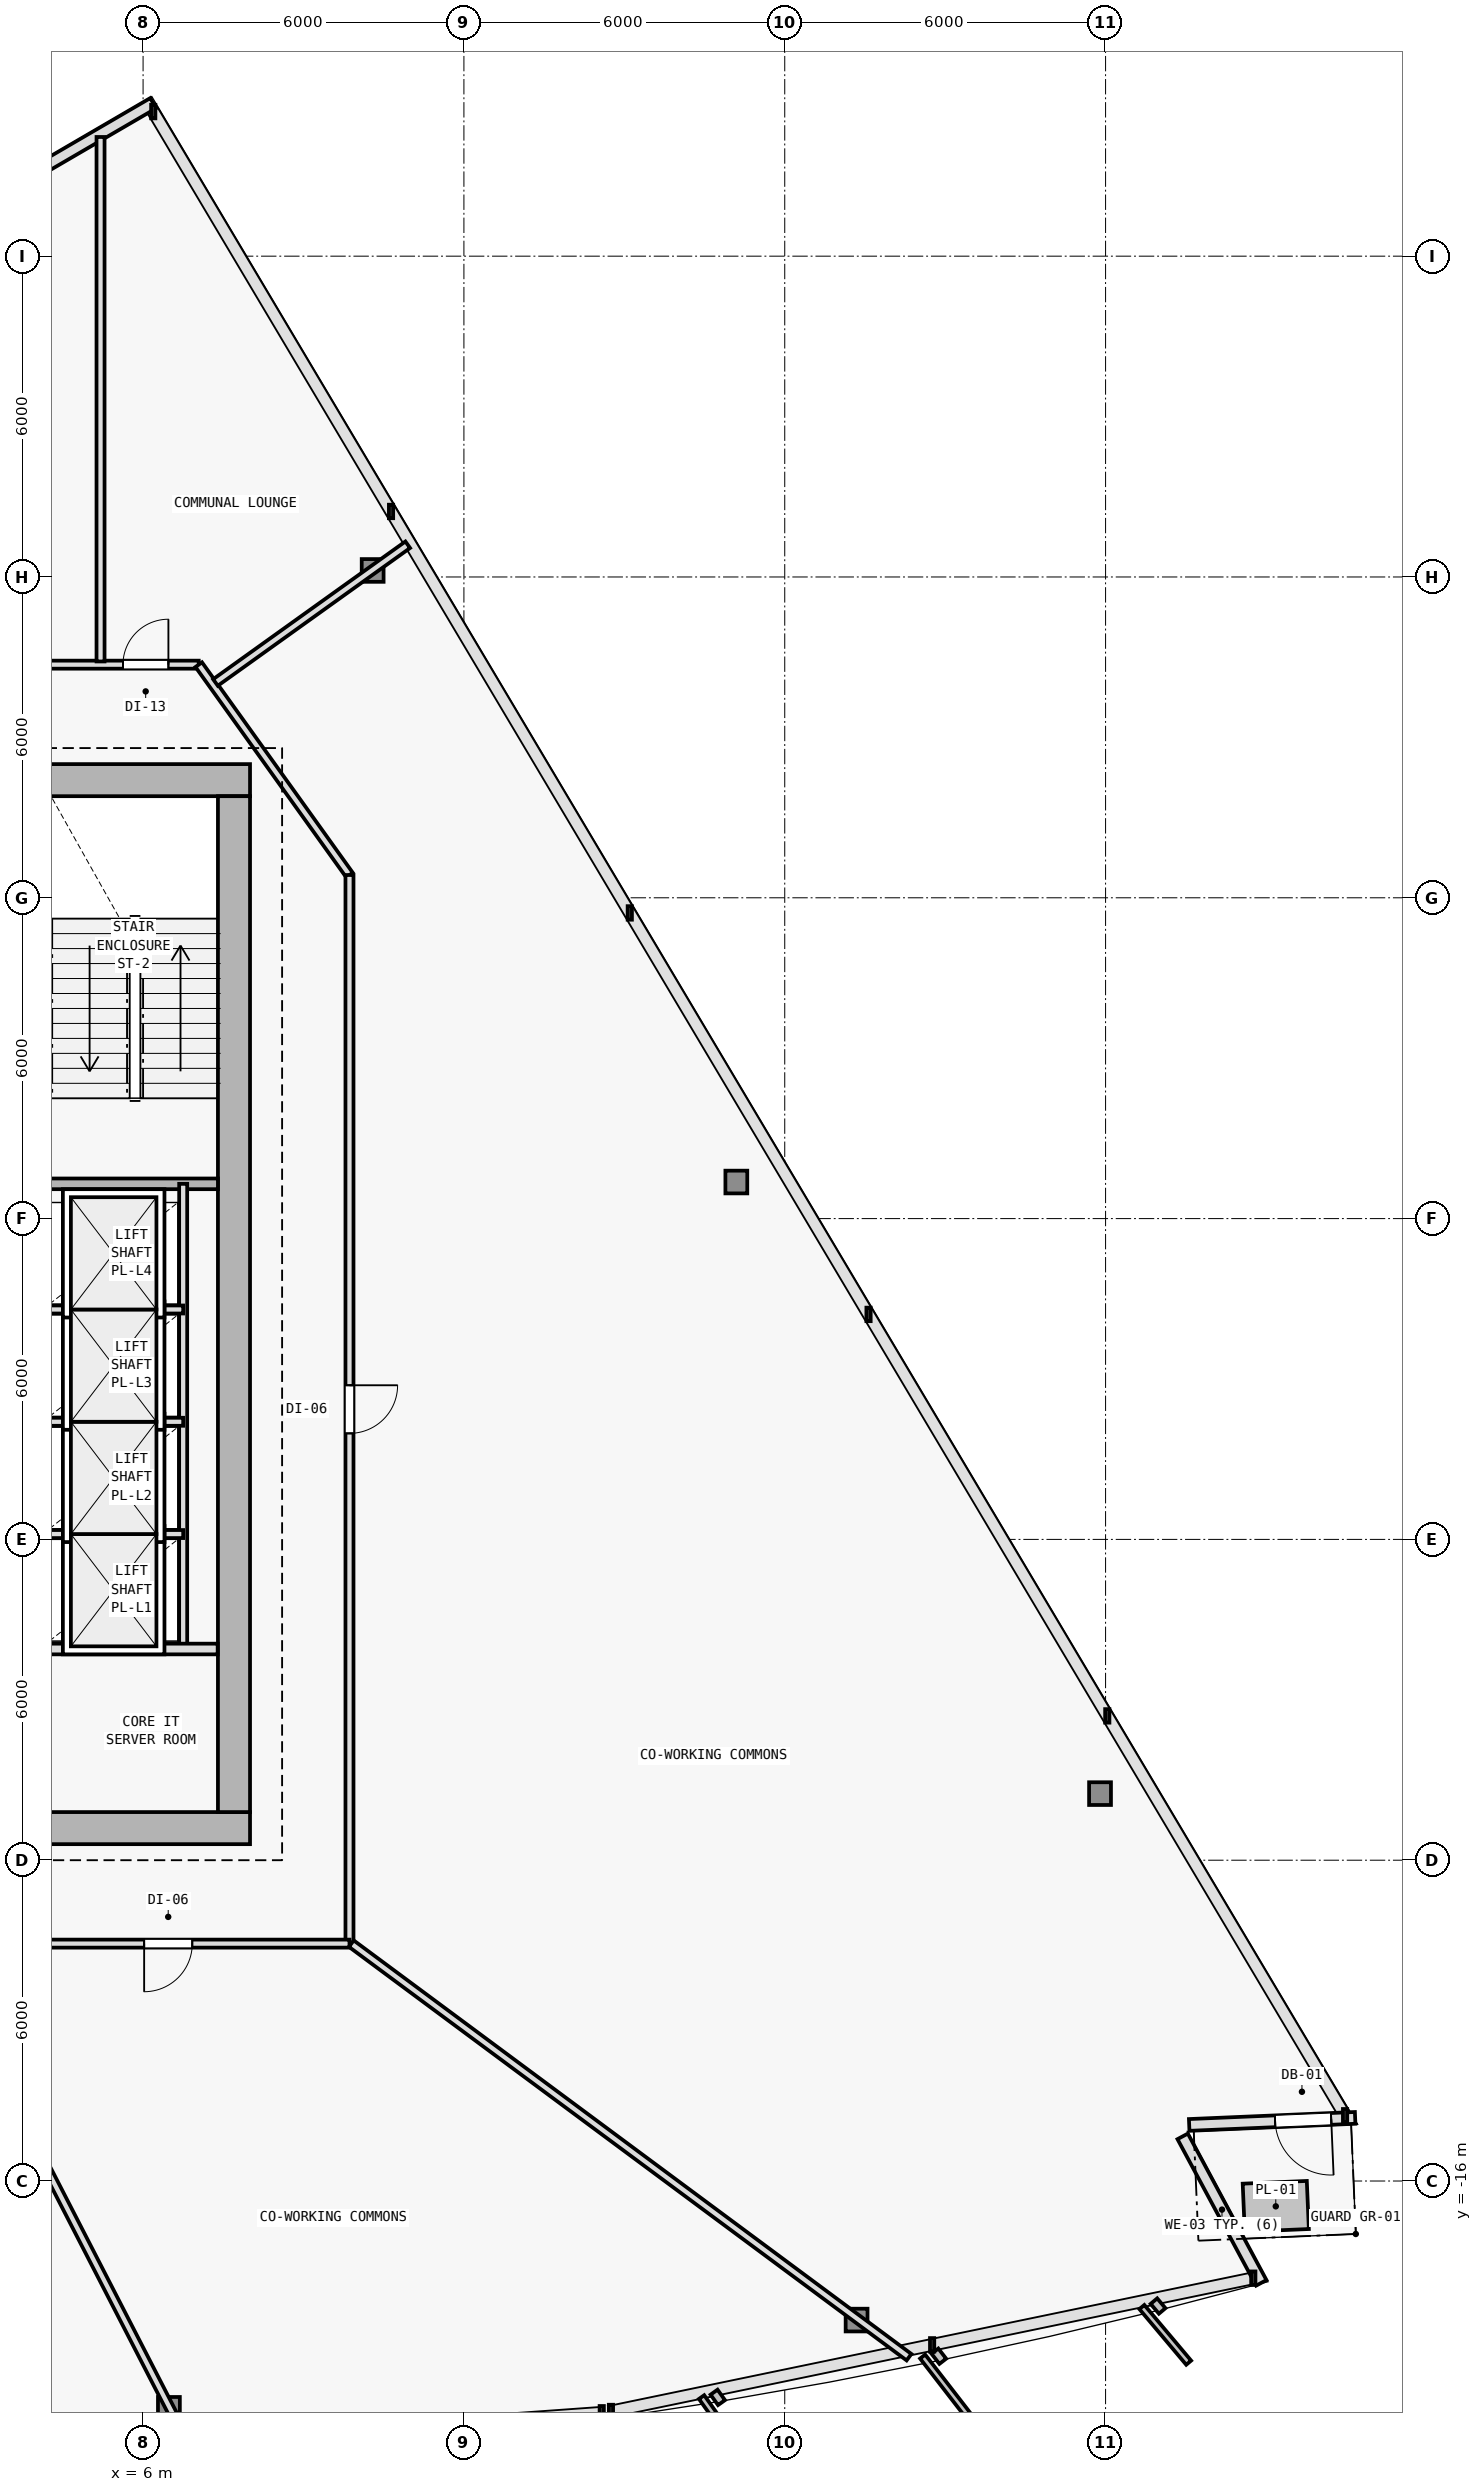
"""IFC4 building model, lengths in metres.
Left out: names, types, materials, properties, quantities, classifications, styles, units other than length and angle.
Written with IfcOpenShell. Run it as: python <this file> out.ifc"""

import sys

from ifc_helpers import new_model, si_unit, direction, frame, frame_2d, origin, origin_2d, place, context, subcontext, project, spatial, rectangle, i_section, extrude, element, fill, save


model = new_model("IFC4")
c1 = context("Model", 3, precision=1e-05, world=origin(), true_north=direction((0.0, 1.0)))
c2 = subcontext(c1, "Body", "Model", "MODEL_VIEW")
j1 = project(units=[si_unit("LENGTHUNIT", "METRE"), si_unit("PLANEANGLEUNIT", "RADIAN")], contexts=[c1])
p1 = place(None, origin())
s1 = spatial("IfcSite", under=j1, at=p1, CompositionType="ELEMENT")
p2 = place(p1, origin())
s2 = spatial("IfcBuilding", under=s1, at=p2, CompositionType="ELEMENT")
p3 = place(p2, frame((0.0, 0.0, 78.0)))
s3 = spatial("IfcBuildingStorey", under=s2, at=p3, CompositionType="ELEMENT", Elevation=78.0)
for number, where, z_axis, x_axis in (
    (1, (7.7, -9.4, 0.0), (0.0, 0.0, 1.0), (1.0, 0.0, 0.0)),
    (2, (7.7, 10.2, 0.0), (0.0, 0.0, 1.0), (1.0, 0.0, 0.0)),
    (3, (7.7, 0.4, 0.0), (0.0, 0.0, 1.0), (1.0, 0.0, 0.0)),
):
    element("IfcColumn", number, at=place(p3, frame(where, z_axis=z_axis, x_axis=x_axis)), inside=s3, PredefinedType="COLUMN", context=c2, shape_type="SweptSolid", body=[
        extrude(i_section(OverallWidth=0.416, OverallDepth=0.446, WebThickness=0.025, FlangeThickness=0.04, FilletRadius=0.015, at=origin_2d()), origin(), (0.0, 0.0, 1.0), 4.5),
    ])
p4 = place(p3, frame((6.483, -20.252, 0.006), z_axis=(-0.005491040061, 0.028216334572, 0.999586758087), x_axis=(-0.981585848295, -0.191021523464, 0.0)))
e4 = element("IfcColumn", 4, at=p4, inside=s3, PredefinedType="COLUMN", context=c2, shape_type="SweptSolid", body=[
    extrude(i_section(OverallWidth=0.409, OverallDepth=0.425, WebThickness=0.021, FlangeThickness=0.034, FilletRadius=0.015, at=origin_2d()), origin(), (0.0, 0.0, 1.0), 4.491),
])
p5 = place(p3, frame((19.344, -18.601, 0.006), z_axis=(-0.016526121628, 0.026800585403, 0.999504185047), x_axis=(-0.851183725565, -0.524867855115, 0.0)))
e5 = element("IfcColumn", 5, at=p5, inside=s3, PredefinedType="COLUMN", context=c2, shape_type="SweptSolid", body=[
    extrude(i_section(OverallWidth=0.409, OverallDepth=0.425, WebThickness=0.021, FlangeThickness=0.034, FilletRadius=0.015, at=origin_2d()), origin(), (0.0, 0.0, 1.0), 4.491),
])
p6 = place(p3, frame((23.896, -8.755, 0.006), z_axis=(-0.020877781541, 0.017289412838, 0.999632529704), x_axis=(-0.637813971185, -0.770190455771, 0.0)))
e6 = element("IfcColumn", 6, at=p6, inside=s3, PredefinedType="COLUMN", context=c2, shape_type="SweptSolid", body=[
    extrude(i_section(OverallWidth=0.409, OverallDepth=0.425, WebThickness=0.021, FlangeThickness=0.034, FilletRadius=0.015, at=origin_2d()), origin(), (0.0, 0.0, 1.0), 4.49),
])
p7 = place(p3, frame((17.095, 2.684, 0.006), z_axis=(-0.015118033886, 0.00761339836, 0.999856730345), x_axis=(-0.449781931574, -0.893138406984, 0.0)))
e7 = element("IfcColumn", 7, at=p7, inside=s3, PredefinedType="COLUMN", context=c2, shape_type="SweptSolid", body=[
    extrude(i_section(OverallWidth=0.409, OverallDepth=0.425, WebThickness=0.021, FlangeThickness=0.034, FilletRadius=0.015, at=origin_2d()), origin(), (0.0, 0.0, 1.0), 4.49),
])
p8 = place(p3, frame((10.293, 14.122, 0.006), z_axis=(-0.009354515717, -0.002012308614, 0.999954220777), x_axis=(0.210305364179, -0.977635746993, 0.0)))
e8 = element("IfcColumn", 8, at=p8, inside=s3, PredefinedType="COLUMN", context=c2, shape_type="SweptSolid", body=[
    extrude(i_section(OverallWidth=0.409, OverallDepth=0.425, WebThickness=0.021, FlangeThickness=0.034, FilletRadius=0.015, at=origin_2d()), origin(), (0.0, 0.0, 1.0), 4.489),
])
p9 = place(p3, frame((25.442, -15.165, 0.0), z_axis=(0.0, 0.0, 1.0), x_axis=(0.472811757317, -0.881163459378, 0.0)))
e9 = element("IfcWall", 9, at=p9, inside=s3, PredefinedType="SOLIDWALL", context=c2, shape_type="SweptSolid", body=[
    extrude(rectangle(XDim=3.11, YDim=0.22, at=frame_2d((1.555, 0.0))), origin(), (0.0, 0.0, 1.0), 4.25),
])
p10 = place(p3, frame((28.667, -14.819, 0.0), z_axis=(0.0, 0.0, 1.0), x_axis=(-0.99909228571, -0.042598176436, 0.0)))
e10 = element("IfcWall", 10, at=p10, inside=s3, PredefinedType="SOLIDWALL", context=c2, shape_type="SweptSolid", body=[
    extrude(rectangle(XDim=3.106, YDim=0.22, at=frame_2d((1.553, 0.0))), origin(), (0.0, 0.0, 1.0), 4.25),
])
p11 = place(p10, frame((0.448, 0.0, 0.0)))
e11 = element("IfcOpeningElement", 11, at=p11, cuts=e10, PredefinedType="OPENING", context=c2, shape_type="SweptSolid", body=[
    extrude(rectangle(XDim=1.05, YDim=2.15, at=frame_2d((0.525, 1.075))), frame((0.0, 0.12, 0.0), z_axis=(0.0, -1.0, 0.0), x_axis=(1.0, 0.0, 0.0)), (0.0, 0.0, 1.0), 0.24),
])
p12 = place(p3, frame((2.142, 20.502, 0.0), z_axis=(0.0, 0.0, 1.0), x_axis=(0.863981097269, 0.503524243272, 0.0)))
e12 = element("IfcWall", 12, at=p12, inside=s3, PredefinedType="SOLIDWALL", context=c2, shape_type="SweptSolid", body=[
    extrude(rectangle(XDim=4.684, YDim=0.22, at=frame_2d((2.342, 0.0))), origin(), (0.0, 0.0, 1.0), 4.25),
])
p13 = place(p3, frame((-8.0, -9.4, 0.0), z_axis=(0.0, 0.0, 1.0), x_axis=(1.0, 0.0, 0.0)))
e13 = element("IfcWall", 13, at=p13, inside=s3, PredefinedType="SHEAR", context=c2, shape_type="SweptSolid", body=[
    extrude(rectangle(XDim=16.0, YDim=0.6, at=frame_2d((8.0, 0.0))), origin(), (0.0, 0.0, 1.0), 4.25),
])
p14 = place(p13, frame((9.65, 0.0, 0.0)))
e14 = element("IfcOpeningElement", 14, at=p14, cuts=e13, PredefinedType="OPENING", context=c2, shape_type="SweptSolid", body=[
    extrude(rectangle(XDim=1.5, YDim=2.2, at=frame_2d((0.75, 1.1))), frame((0.0, 0.31, 0.0), z_axis=(0.0, -1.0, 0.0), x_axis=(1.0, 0.0, 0.0)), (0.0, 0.0, 1.0), 0.62),
])
p15 = place(p3, frame((8.0, 10.2, 0.0), z_axis=(0.0, 0.0, 1.0), x_axis=(-1.0, 0.0, 0.0)))
e15 = element("IfcWall", 15, at=p15, inside=s3, PredefinedType="SHEAR", context=c2, shape_type="SweptSolid", body=[
    extrude(rectangle(XDim=16.0, YDim=0.6, at=frame_2d((8.0, 0.0))), origin(), (0.0, 0.0, 1.0), 4.25),
])
p16 = place(p15, frame((4.45, 0.0, 0.0)))
e16 = element("IfcOpeningElement", 16, at=p16, cuts=e15, PredefinedType="OPENING", context=c2, shape_type="SweptSolid", body=[
    extrude(rectangle(XDim=1.1, YDim=2.15, at=frame_2d((0.55, 1.075))), frame((0.0, 0.31, 0.0), z_axis=(0.0, -1.0, 0.0), x_axis=(1.0, 0.0, 0.0)), (0.0, 0.0, 1.0), 0.62),
])
p17 = place(p3, frame((7.7, 9.9, 0.0), z_axis=(0.0, 0.0, 1.0), x_axis=(0.0, -1.0, 0.0)))
e17 = element("IfcWall", 17, at=p17, inside=s3, PredefinedType="SHEAR", context=c2, shape_type="SweptSolid", body=[
    extrude(rectangle(XDim=19.0, YDim=0.6, at=frame_2d((9.5, 0.0))), origin(), (0.0, 0.0, 1.0), 4.25),
])
p18 = place(p3, frame((4.05, 2.65, 0.0), z_axis=(0.0, 0.0, 1.0), x_axis=(1.0, 0.0, 0.0)))
e18 = element("IfcWall", 18, at=p18, inside=s3, PredefinedType="SOLIDWALL", context=c2, shape_type="SweptSolid", body=[
    extrude(rectangle(XDim=3.35, YDim=0.2, at=frame_2d((1.675, 0.0))), origin(), (0.0, 0.0, 1.0), 4.25),
])
p19 = place(p3, frame((6.75, -6.05, 0.0), z_axis=(0.0, 0.0, 1.0), x_axis=(0.0, 1.0, 0.0)))
e19 = element("IfcWall", 19, at=p19, inside=s3, PredefinedType="PARTITIONING", context=c2, shape_type="SweptSolid", body=[
    extrude(rectangle(XDim=8.7, YDim=0.15, at=frame_2d((4.35, 0.0))), origin(), (0.0, 0.0, 1.0), 4.25),
])
for number, where, z_axis, x_axis in (
    (20, (4.15, -3.9, 0.0), (0.0, 0.0, 1.0), (1.0, 0.0, 0.0)),
    (21, (4.15, -1.8, 0.0), (0.0, 0.0, 1.0), (1.0, 0.0, 0.0)),
    (22, (4.15, 0.3, 0.0), (0.0, 0.0, 1.0), (1.0, 0.0, 0.0)),
):
    element("IfcWall", number, at=place(p3, frame(where, z_axis=z_axis, x_axis=x_axis)), inside=s3, PredefinedType="PARTITIONING", context=c2, shape_type="SweptSolid", body=[
        extrude(rectangle(XDim=2.6, YDim=0.15, at=frame_2d((1.3, 0.0))), origin(), (0.0, 0.0, 1.0), 4.25),
    ])
p20 = place(p3, frame((4.15, -6.05, 0.0), z_axis=(0.0, 0.0, 1.0), x_axis=(1.0, 0.0, 0.0)))
e23 = element("IfcWall", 23, at=p20, inside=s3, PredefinedType="SOLIDWALL", context=c2, shape_type="SweptSolid", body=[
    extrude(rectangle(XDim=3.245, YDim=0.2, at=frame_2d((1.623, 0.0))), origin(), (0.0, 0.0, 1.0), 4.25),
])
p21 = place(p3, frame((-7.041, 12.36, 0.0), z_axis=(0.0, 0.0, 1.0), x_axis=(1.0, 0.0, 0.0)))
e24 = element("IfcWall", 24, at=p21, inside=s3, PredefinedType="PARTITIONING", context=c2, shape_type="SweptSolid", body=[
    extrude(rectangle(XDim=14.082, YDim=0.15, at=frame_2d((7.041, 0.0))), origin(), (0.0, 0.0, 1.0), 4.25),
])
p22 = place(p21, frame((12.665, 0.0, 0.0)))
e25 = element("IfcOpeningElement", 25, at=p22, cuts=e24, PredefinedType="OPENING", context=c2, shape_type="SweptSolid", body=[
    extrude(rectangle(XDim=0.85, YDim=2.1, at=frame_2d((0.425, 1.05))), frame((0.0, 0.085, 0.0), z_axis=(0.0, -1.0, 0.0), x_axis=(1.0, 0.0, 0.0)), (0.0, 0.0, 1.0), 0.17),
])
p23 = place(p21, frame((9.584, 0.0, 0.0)))
e26 = element("IfcOpeningElement", 26, at=p23, cuts=e24, PredefinedType="OPENING", context=c2, shape_type="SweptSolid", body=[
    extrude(rectangle(XDim=0.9, YDim=2.1, at=frame_2d((0.45, 1.05))), frame((0.0, 0.085, 0.0), z_axis=(0.0, -1.0, 0.0), x_axis=(1.0, 0.0, 0.0)), (0.0, 0.0, 1.0), 0.17),
])
p24 = place(p21, frame((5.465, 0.0, 0.0)))
e27 = element("IfcOpeningElement", 27, at=p24, cuts=e24, PredefinedType="OPENING", context=c2, shape_type="SweptSolid", body=[
    extrude(rectangle(XDim=0.9, YDim=2.1, at=frame_2d((0.45, 1.05))), frame((0.0, 0.085, 0.0), z_axis=(0.0, -1.0, 0.0), x_axis=(1.0, 0.0, 0.0)), (0.0, 0.0, 1.0), 0.17),
])
p25 = place(p21, frame((1.642, 0.0, 0.0)))
e28 = element("IfcOpeningElement", 28, at=p25, cuts=e24, PredefinedType="OPENING", context=c2, shape_type="SweptSolid", body=[
    extrude(rectangle(XDim=0.9, YDim=2.1, at=frame_2d((0.45, 1.05))), frame((0.0, 0.085, 0.0), z_axis=(0.0, -1.0, 0.0), x_axis=(1.0, 0.0, 0.0)), (0.0, 0.0, 1.0), 0.17),
])
p26 = place(p3, frame((7.041, 12.36, 0.0), z_axis=(0.0, 0.0, 1.0), x_axis=(0.582449511476, -0.812866881218, 0.0)))
e29 = element("IfcWall", 29, at=p26, inside=s3, PredefinedType="PARTITIONING", context=c2, shape_type="SweptSolid", body=[
    extrude(rectangle(XDim=4.84, YDim=0.15, at=frame_2d((2.42, 0.0))), origin(), (0.0, 0.0, 1.0), 3.625),
])
p27 = place(p3, frame((9.86, 8.426, 0.0), z_axis=(0.0, 0.0, 1.0), x_axis=(0.0, -1.0, 0.0)))
e30 = element("IfcWall", 30, at=p27, inside=s3, PredefinedType="PARTITIONING", context=c2, shape_type="SweptSolid", body=[
    extrude(rectangle(XDim=19.986, YDim=0.15, at=frame_2d((9.993, 0.0))), origin(), (0.0, 0.0, 1.0), 3.509),
])
p28 = place(p27, frame((9.543, 0.0, 0.0)))
e31 = element("IfcOpeningElement", 31, at=p28, cuts=e30, PredefinedType="OPENING", context=c2, shape_type="SweptSolid", body=[
    extrude(rectangle(XDim=0.9, YDim=2.1, at=frame_2d((0.45, 1.05))), frame((0.0, 0.085, 0.0), z_axis=(0.0, -1.0, 0.0), x_axis=(1.0, 0.0, 0.0)), (0.0, 0.0, 1.0), 0.17),
])
p29 = place(p3, frame((9.86, -11.56, 0.0), z_axis=(0.0, 0.0, 1.0), x_axis=(-1.0, 0.0, 0.0)))
e32 = element("IfcWall", 32, at=p29, inside=s3, PredefinedType="PARTITIONING", context=c2, shape_type="SweptSolid", body=[
    extrude(rectangle(XDim=6.78, YDim=0.15, at=frame_2d((3.39, 0.0))), origin(), (0.0, 0.0, 1.0), 3.925),
])
p30 = place(p29, frame((2.94, 0.0, 0.0)))
e33 = element("IfcOpeningElement", 33, at=p30, cuts=e32, PredefinedType="OPENING", context=c2, shape_type="SweptSolid", body=[
    extrude(rectangle(XDim=0.9, YDim=2.1, at=frame_2d((0.45, 1.05))), frame((0.0, 0.085, 0.0), z_axis=(0.0, -1.0, 0.0), x_axis=(1.0, 0.0, 0.0)), (0.0, 0.0, 1.0), 0.17),
])
p31 = place(p3, frame((3.066, -13.573, 0.0), z_axis=(0.0, 0.0, 1.0), x_axis=(0.457623291796, -0.889146176287, 0.0)))
e34 = element("IfcWall", 34, at=p31, inside=s3, PredefinedType="PARTITIONING", context=c2, shape_type="SweptSolid", body=[
    extrude(rectangle(XDim=8.456, YDim=0.15, at=frame_2d((4.228, 0.0))), origin(), (0.0, 0.0, 1.0), 3.625),
])
p32 = place(p3, frame((9.895, -11.56, 0.0), z_axis=(0.0, 0.0, 1.0), x_axis=(0.80320598441, -0.59570139047, 0.0)))
e35 = element("IfcWall", 35, at=p32, inside=s3, PredefinedType="PARTITIONING", context=c2, shape_type="SweptSolid", body=[
    extrude(rectangle(XDim=12.984, YDim=0.15, at=frame_2d((6.492, 0.0))), origin(), (0.0, 0.0, 1.0), 3.625),
])
p33 = place(p3, frame((7.354, 12.027, 0.0), z_axis=(0.0, 0.0, 1.0), x_axis=(0.812897262099, 0.582407109565, 0.0)))
e36 = element("IfcWall", 36, at=p33, inside=s3, PredefinedType="PARTITIONING", context=c2, shape_type="SweptSolid", body=[
    extrude(rectangle(XDim=4.423, YDim=0.15, at=frame_2d((2.212, 0.0))), origin(), (0.0, 0.0, 1.0), 3.625),
])
p34 = place(p3, frame((5.204, 12.42, 0.0), z_axis=(0.0, 0.0, 1.0), x_axis=(0.0, 1.0, 0.0)))
e37 = element("IfcWall", 37, at=p34, inside=s3, PredefinedType="PARTITIONING", context=c2, shape_type="SweptSolid", body=[
    extrude(rectangle(XDim=9.809, YDim=0.15, at=frame_2d((4.905, 0.0))), origin(), (0.0, 0.0, 1.0), 3.735),
])
p35 = place(p11, origin())
e38 = element("IfcDoor", 38, at=p35, inside=s3, OperationType="SINGLE_SWING_LEFT", PredefinedType="DOOR", context=c2, shape_type="SweptSolid", body=[
    extrude(rectangle(XDim=1.05, YDim=2.15, at=frame_2d((0.525, 1.075))), frame((0.0, 0.025, 0.0), z_axis=(0.0, -1.0, 0.0), x_axis=(1.0, 0.0, 0.0)), (0.0, 0.0, 1.0), 0.05),
])
fill(e11, e38)
p36 = place(p30, origin())
e39 = element("IfcDoor", 39, at=p36, inside=s3, OperationType="SINGLE_SWING_RIGHT", PredefinedType="DOOR", context=c2, shape_type="SweptSolid", body=[
    extrude(rectangle(XDim=0.9, YDim=2.1, at=frame_2d((0.45, 1.05))), frame((0.0, 0.025, 0.0), z_axis=(0.0, -1.0, 0.0), x_axis=(1.0, 0.0, 0.0)), (0.0, 0.0, 1.0), 0.05),
])
fill(e33, e39)
p37 = place(p28, origin())
e40 = element("IfcDoor", 40, at=p37, inside=s3, OperationType="SINGLE_SWING_LEFT", PredefinedType="DOOR", context=c2, shape_type="SweptSolid", body=[
    extrude(rectangle(XDim=0.9, YDim=2.1, at=frame_2d((0.45, 1.05))), frame((0.0, 0.025, 0.0), z_axis=(0.0, -1.0, 0.0), x_axis=(1.0, 0.0, 0.0)), (0.0, 0.0, 1.0), 0.05),
])
fill(e31, e40)
p38 = place(p22, origin())
e41 = element("IfcDoor", 41, at=p38, inside=s3, OperationType="SINGLE_SWING_RIGHT", PredefinedType="DOOR", context=c2, shape_type="SweptSolid", body=[
    extrude(rectangle(XDim=0.85, YDim=2.1, at=frame_2d((0.425, 1.05))), frame((0.0, 0.025, 0.0), z_axis=(0.0, -1.0, 0.0), x_axis=(1.0, 0.0, 0.0)), (0.0, 0.0, 1.0), 0.05),
])
fill(e25, e41)
save(model, sys.argv[1])
